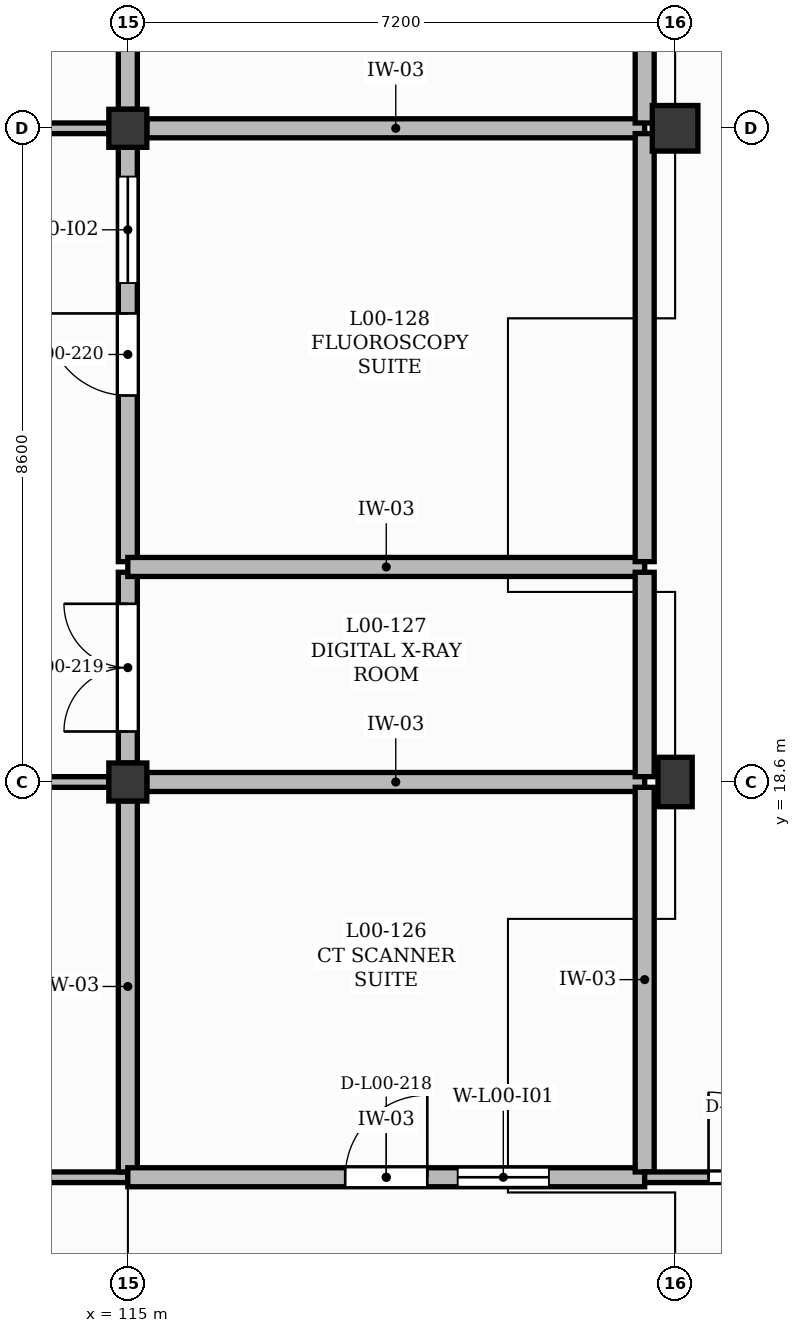
"""IFC4 building model, lengths in metres.
Left out: names, types, materials, properties, quantities, classifications, styles, units other than length and angle.
Written with IfcOpenShell. Run it as: python <this file> out.ifc"""

import sys

from ifc_helpers import new_model, si_unit, direction, frame, frame_2d, origin, origin_2d, place, context, subcontext, project, spatial, rectangle, extrude, element, fill, save


model = new_model("IFC4")
c1 = context("Model", 3, precision=1e-05, world=origin(), true_north=direction((0.0, 1.0)))
c2 = subcontext(c1, "Body", "Model", "MODEL_VIEW")
j1 = project(units=[si_unit("LENGTHUNIT", "METRE"), si_unit("PLANEANGLEUNIT", "RADIAN")], contexts=[c1])
p1 = place(None, origin())
s1 = spatial("IfcSite", under=j1, at=p1, CompositionType="ELEMENT")
p2 = place(p1, origin())
s2 = spatial("IfcBuilding", under=s1, at=p2, CompositionType="ELEMENT")
p3 = place(p2, origin())
s3 = spatial("IfcBuildingStorey", under=s2, at=p3, CompositionType="ELEMENT", Elevation=0.0)
for number, where, z_axis, x_axis in (
    (1, (115.0, 18.6, 0.0), (0.0, 0.0, 1.0), (1.0, 0.0, 0.0)),
    (2, (115.0, 27.2, 0.0), (0.0, 0.0, 1.0), (1.0, 0.0, 0.0)),
):
    element("IfcColumn", number, at=place(p3, frame(where, z_axis=z_axis, x_axis=x_axis)), inside=s3, PredefinedType="COLUMN", context=c2, shape_type="SweptSolid", body=[
        extrude(rectangle(XDim=0.5, YDim=0.5, at=origin_2d()), origin(), (0.0, 0.0, 1.0), 4.2),
    ])
p4 = place(p3, frame((122.2, 18.6, 0.0), z_axis=(0.0, 0.0, 1.0), x_axis=(1.0, 0.0, 0.0)))
e3 = element("IfcColumn", 3, at=p4, inside=s3, PredefinedType="COLUMN", context=c2, shape_type="SweptSolid", body=[
    extrude(rectangle(XDim=0.45, YDim=0.65, at=origin_2d()), origin(), (0.0, 0.0, 1.0), 4.2),
])
p5 = place(p3, frame((122.2, 27.2, 0.0), z_axis=(0.0, 0.0, 1.0), x_axis=(1.0, 0.0, 0.0)))
e4 = element("IfcColumn", 4, at=p5, inside=s3, PredefinedType="COLUMN", context=c2, shape_type="SweptSolid", body=[
    extrude(rectangle(XDim=0.6, YDim=0.6, at=origin_2d()), origin(), (0.0, 0.0, 1.0), 4.2),
])
p6 = place(p3, frame((110.6, 13.4, 0.0), z_axis=(0.0, 0.0, 1.0), x_axis=(1.0, 0.0, 0.0)))
e5 = element("IfcWall", 5, at=p6, inside=s3, PredefinedType="PARTITIONING", context=c2, shape_type="SweptSolid", body=[
    extrude(rectangle(XDim=4.4, YDim=0.14, at=frame_2d((2.2, 0.0))), origin(), (0.0, 0.0, 1.0), 4.18),
])
p7 = place(p3, frame((110.6, 18.6, 0.0), z_axis=(0.0, 0.0, 1.0), x_axis=(1.0, 0.0, 0.0)))
e6 = element("IfcWall", 6, at=p7, inside=s3, PredefinedType="PARTITIONING", context=c2, shape_type="SweptSolid", body=[
    extrude(rectangle(XDim=4.15, YDim=0.14, at=frame_2d((2.075, 0.0))), origin(), (0.0, 0.0, 1.0), 3.25),
])
p8 = place(p3, frame((110.6, 27.2, 0.0), z_axis=(0.0, 0.0, 1.0), x_axis=(1.0, 0.0, 0.0)))
e7 = element("IfcWall", 7, at=p8, inside=s3, PredefinedType="PARTITIONING", context=c2, shape_type="SweptSolid", body=[
    extrude(rectangle(XDim=4.15, YDim=0.14, at=frame_2d((2.075, 0.0))), origin(), (0.0, 0.0, 1.0), 3.6),
])
p9 = place(p3, frame((115.0, 13.47, 0.0), z_axis=(0.0, 0.0, 1.0), x_axis=(0.0, 1.0, 0.0)))
e8 = element("IfcWall", 8, at=p9, inside=s3, PredefinedType="SOLIDWALL", context=c2, shape_type="SweptSolid", body=[
    extrude(rectangle(XDim=4.88, YDim=0.25, at=frame_2d((2.44, 0.0))), origin(), (0.0, 0.0, 1.0), 3.5),
])
p10 = place(p3, frame((115.0, 13.4, 0.0), z_axis=(0.0, 0.0, 1.0), x_axis=(1.0, 0.0, 0.0)))
e9 = element("IfcWall", 9, at=p10, inside=s3, PredefinedType="SOLIDWALL", context=c2, shape_type="SweptSolid", body=[
    extrude(rectangle(XDim=6.8, YDim=0.25, at=frame_2d((3.4, 0.0))), origin(), (0.0, 0.0, 1.0), 4.18),
])
p11 = place(p10, frame((2.86, 0.0, 0.0)))
e10 = element("IfcOpeningElement", 10, at=p11, cuts=e9, PredefinedType="OPENING", context=c2, shape_type="SweptSolid", body=[
    extrude(rectangle(XDim=1.08, YDim=2.15, at=frame_2d((0.54, 1.075))), frame((0.0, 0.135, 0.0), z_axis=(0.0, -1.0, 0.0), x_axis=(1.0, 0.0, 0.0)), (0.0, 0.0, 1.0), 0.27),
])
p12 = place(p10, frame((4.34, 0.0, 1.05)))
e11 = element("IfcOpeningElement", 11, at=p12, cuts=e9, PredefinedType="OPENING", context=c2, shape_type="SweptSolid", body=[
    extrude(rectangle(XDim=1.2, YDim=1.1, at=frame_2d((0.6, 0.55))), frame((0.0, 0.135, 0.0), z_axis=(0.0, -1.0, 0.0), x_axis=(1.0, 0.0, 0.0)), (0.0, 0.0, 1.0), 0.27),
])
p13 = place(p3, frame((115.0, 18.85, 0.0), z_axis=(0.0, 0.0, 1.0), x_axis=(0.0, 1.0, 0.0)))
e12 = element("IfcWall", 12, at=p13, inside=s3, PredefinedType="SOLIDWALL", context=c2, shape_type="SweptSolid", body=[
    extrude(rectangle(XDim=2.509, YDim=0.25, at=frame_2d((1.254, 0.0))), origin(), (0.0, 0.0, 1.0), 3.4),
])
p14 = place(p13, frame((0.415, 0.0, 0.0)))
e13 = element("IfcOpeningElement", 13, at=p14, cuts=e12, PredefinedType="OPENING", context=c2, shape_type="SweptSolid", body=[
    extrude(rectangle(XDim=1.68, YDim=2.3, at=frame_2d((0.84, 1.15))), frame((0.0, 0.135, 0.0), z_axis=(0.0, -1.0, 0.0), x_axis=(1.0, 0.0, 0.0)), (0.0, 0.0, 1.0), 0.27),
])
p15 = place(p3, frame((115.25, 18.6, 0.0), z_axis=(0.0, 0.0, 1.0), x_axis=(1.0, 0.0, 0.0)))
e14 = element("IfcWall", 14, at=p15, inside=s3, PredefinedType="SOLIDWALL", context=c2, shape_type="SweptSolid", body=[
    extrude(rectangle(XDim=6.55, YDim=0.25, at=frame_2d((3.275, 0.0))), origin(), (0.0, 0.0, 1.0), 3.25),
])
p16 = place(p3, frame((115.0, 21.499, 0.0), z_axis=(0.0, 0.0, 1.0), x_axis=(0.0, 1.0, 0.0)))
e15 = element("IfcWall", 15, at=p16, inside=s3, PredefinedType="SOLIDWALL", context=c2, shape_type="SweptSolid", body=[
    extrude(rectangle(XDim=5.451, YDim=0.25, at=frame_2d((2.726, 0.0))), origin(), (0.0, 0.0, 1.0), 3.4),
])
p17 = place(p16, frame((2.186, 0.0, 0.0)))
e16 = element("IfcOpeningElement", 16, at=p17, cuts=e15, PredefinedType="OPENING", context=c2, shape_type="SweptSolid", body=[
    extrude(rectangle(XDim=1.08, YDim=2.15, at=frame_2d((0.54, 1.075))), frame((0.0, 0.135, 0.0), z_axis=(0.0, -1.0, 0.0), x_axis=(1.0, 0.0, 0.0)), (0.0, 0.0, 1.0), 0.27),
])
p18 = place(p16, frame((3.666, 0.0, 1.05)))
e17 = element("IfcOpeningElement", 17, at=p18, cuts=e15, PredefinedType="OPENING", context=c2, shape_type="SweptSolid", body=[
    extrude(rectangle(XDim=1.4, YDim=1.1, at=frame_2d((0.7, 0.55))), frame((0.0, 0.135, 0.0), z_axis=(0.0, -1.0, 0.0), x_axis=(1.0, 0.0, 0.0)), (0.0, 0.0, 1.0), 0.27),
])
p19 = place(p3, frame((115.0, 21.429, 0.0), z_axis=(0.0, 0.0, 1.0), x_axis=(1.0, 0.0, 0.0)))
e18 = element("IfcWall", 18, at=p19, inside=s3, PredefinedType="SOLIDWALL", context=c2, shape_type="SweptSolid", body=[
    extrude(rectangle(XDim=6.8, YDim=0.25, at=frame_2d((3.4, 0.0))), origin(), (0.0, 0.0, 1.0), 4.18),
])
p20 = place(p3, frame((115.0, 27.45, 0.0), z_axis=(0.0, 0.0, 1.0), x_axis=(0.0, 1.0, 0.0)))
e19 = element("IfcWall", 19, at=p20, inside=s3, PredefinedType="SOLIDWALL", context=c2, shape_type="SweptSolid", body=[
    extrude(rectangle(XDim=4.97, YDim=0.25, at=frame_2d((2.485, 0.0))), origin(), (0.0, 0.0, 1.0), 3.4),
])
p21 = place(p3, frame((115.25, 27.2, 0.0), z_axis=(0.0, 0.0, 1.0), x_axis=(1.0, 0.0, 0.0)))
e20 = element("IfcWall", 20, at=p21, inside=s3, PredefinedType="SOLIDWALL", context=c2, shape_type="SweptSolid", body=[
    extrude(rectangle(XDim=6.55, YDim=0.25, at=frame_2d((3.275, 0.0))), origin(), (0.0, 0.0, 1.0), 3.6),
])
p22 = place(p3, frame((121.8, 13.47, 0.0), z_axis=(0.0, 0.0, 1.0), x_axis=(0.0, 1.0, 0.0)))
e21 = element("IfcWall", 21, at=p22, inside=s3, PredefinedType="SOLIDWALL", context=c2, shape_type="SweptSolid", body=[
    extrude(rectangle(XDim=5.06, YDim=0.25, at=frame_2d((2.53, 0.0))), origin(), (0.0, 0.0, 1.0), 4.18),
])
p23 = place(p3, frame((121.8, 13.4, 0.0), z_axis=(0.0, 0.0, 1.0), x_axis=(1.0, 0.0, 0.0)))
e22 = element("IfcWall", 22, at=p23, inside=s3, PredefinedType="PARTITIONING", context=c2, shape_type="SweptSolid", body=[
    extrude(rectangle(XDim=2.8, YDim=0.14, at=frame_2d((1.4, 0.0))), origin(), (0.0, 0.0, 1.0), 4.18),
])
p24 = place(p23, frame((0.84, 0.0, 0.0)))
e23 = element("IfcOpeningElement", 23, at=p24, cuts=e22, PredefinedType="OPENING", context=c2, shape_type="SweptSolid", body=[
    extrude(rectangle(XDim=1.12, YDim=2.15, at=frame_2d((0.56, 1.075))), frame((0.0, 0.08, 0.0), z_axis=(0.0, -1.0, 0.0), x_axis=(1.0, 0.0, 0.0)), (0.0, 0.0, 1.0), 0.16),
])
p25 = place(p3, frame((121.8, 18.67, 0.0), z_axis=(0.0, 0.0, 1.0), x_axis=(0.0, 1.0, 0.0)))
e24 = element("IfcWall", 24, at=p25, inside=s3, PredefinedType="SOLIDWALL", context=c2, shape_type="SweptSolid", body=[
    extrude(rectangle(XDim=2.689, YDim=0.25, at=frame_2d((1.344, 0.0))), origin(), (0.0, 0.0, 1.0), 4.18),
])
p26 = place(p3, frame((121.8, 21.499, 0.0), z_axis=(0.0, 0.0, 1.0), x_axis=(0.0, 1.0, 0.0)))
e25 = element("IfcWall", 25, at=p26, inside=s3, PredefinedType="SOLIDWALL", context=c2, shape_type="SweptSolid", body=[
    extrude(rectangle(XDim=5.631, YDim=0.25, at=frame_2d((2.815, 0.0))), origin(), (0.0, 0.0, 1.0), 4.18),
])
p27 = place(p3, frame((121.8, 27.27, 0.0), z_axis=(0.0, 0.0, 1.0), x_axis=(0.0, 1.0, 0.0)))
e26 = element("IfcWall", 26, at=p27, inside=s3, PredefinedType="SOLIDWALL", context=c2, shape_type="SweptSolid", body=[
    extrude(rectangle(XDim=5.15, YDim=0.25, at=frame_2d((2.575, 0.0))), origin(), (0.0, 0.0, 1.0), 4.18),
])
p28 = place(p27, frame((1.735, 0.0, 0.0)))
e27 = element("IfcOpeningElement", 27, at=p28, cuts=e26, PredefinedType="OPENING", context=c2, shape_type="SweptSolid", body=[
    extrude(rectangle(XDim=1.68, YDim=2.3, at=frame_2d((0.84, 1.15))), frame((0.0, 0.135, 0.0), z_axis=(0.0, -1.0, 0.0), x_axis=(1.0, 0.0, 0.0)), (0.0, 0.0, 1.0), 0.27),
])
p29 = place(p24, origin())
e28 = element("IfcDoor", 28, at=p29, inside=s3, OperationType="SINGLE_SWING_LEFT", PredefinedType="DOOR", context=c2, shape_type="SweptSolid", body=[
    extrude(rectangle(XDim=1.12, YDim=2.15, at=frame_2d((0.56, 1.075))), frame((0.0, 0.025, 0.0), z_axis=(0.0, -1.0, 0.0), x_axis=(1.0, 0.0, 0.0)), (0.0, 0.0, 1.0), 0.05),
])
fill(e23, e28)
p30 = place(p11, origin())
e29 = element("IfcDoor", 29, at=p30, inside=s3, OperationType="SINGLE_SWING_RIGHT", PredefinedType="DOOR", context=c2, shape_type="SweptSolid", body=[
    extrude(rectangle(XDim=1.08, YDim=2.15, at=frame_2d((0.54, 1.075))), frame((0.0, 0.025, 0.0), z_axis=(0.0, -1.0, 0.0), x_axis=(1.0, 0.0, 0.0)), (0.0, 0.0, 1.0), 0.05),
])
fill(e10, e29)
p31 = place(p12, origin())
e30 = element("IfcWindow", 30, at=p31, inside=s3, PartitioningType="SINGLE_PANEL", PredefinedType="WINDOW", context=c2, shape_type="SweptSolid", body=[
    extrude(rectangle(XDim=1.2, YDim=1.1, at=frame_2d((0.6, 0.55))), frame((0.0, 0.03, 0.0), z_axis=(0.0, -1.0, 0.0), x_axis=(1.0, 0.0, 0.0)), (0.0, 0.0, 1.0), 0.06),
])
fill(e11, e30)
p32 = place(p14, origin())
e31 = element("IfcDoor", 31, at=p32, inside=s3, OperationType="DOUBLE_DOOR_SINGLE_SWING", PredefinedType="DOOR", context=c2, shape_type="SweptSolid", body=[
    extrude(rectangle(XDim=1.68, YDim=2.3, at=frame_2d((0.84, 1.15))), frame((0.0, 0.025, 0.0), z_axis=(0.0, -1.0, 0.0), x_axis=(1.0, 0.0, 0.0)), (0.0, 0.0, 1.0), 0.05),
])
fill(e13, e31)
p33 = place(p17, origin())
e32 = element("IfcDoor", 32, at=p33, inside=s3, OperationType="SINGLE_SWING_RIGHT", PredefinedType="DOOR", context=c2, shape_type="SweptSolid", body=[
    extrude(rectangle(XDim=1.08, YDim=2.15, at=frame_2d((0.54, 1.075))), frame((0.0, 0.025, 0.0), z_axis=(0.0, -1.0, 0.0), x_axis=(1.0, 0.0, 0.0)), (0.0, 0.0, 1.0), 0.05),
])
fill(e16, e32)
p34 = place(p18, origin())
e33 = element("IfcWindow", 33, at=p34, inside=s3, PartitioningType="SINGLE_PANEL", PredefinedType="WINDOW", context=c2, shape_type="SweptSolid", body=[
    extrude(rectangle(XDim=1.4, YDim=1.1, at=frame_2d((0.7, 0.55))), frame((0.0, 0.03, 0.0), z_axis=(0.0, -1.0, 0.0), x_axis=(1.0, 0.0, 0.0)), (0.0, 0.0, 1.0), 0.06),
])
fill(e17, e33)
save(model, sys.argv[1])
